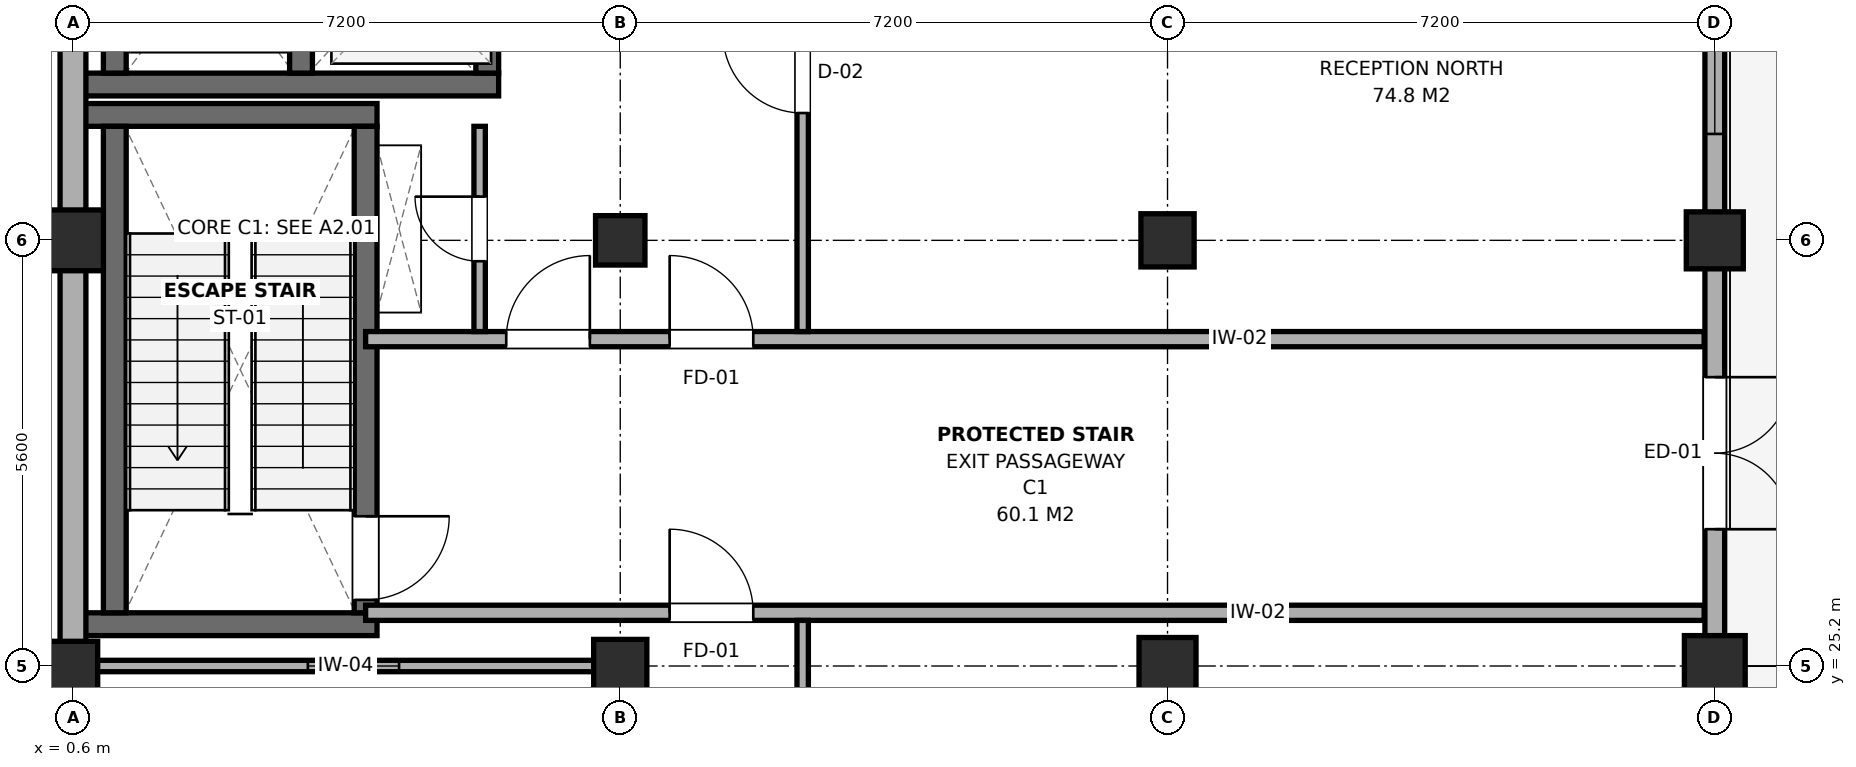
"""IFC4 building model, lengths in metres.
Left out: names, types, materials, properties, quantities, classifications, styles, units other than length and angle.
Written with IfcOpenShell. Run it as: python <this file> out.ifc"""

import sys

from ifc_helpers import new_model, si_unit, direction, frame, frame_2d, origin, origin_2d, place, context, subcontext, project, spatial, rectangle, extrude, element, fill, save


model = new_model("IFC4")
c1 = context("Model", 3, precision=1e-05, world=origin(), true_north=direction((0.0, 1.0)))
c2 = subcontext(c1, "Body", "Model", "MODEL_VIEW")
j1 = project(units=[si_unit("LENGTHUNIT", "METRE"), si_unit("PLANEANGLEUNIT", "RADIAN")], contexts=[c1])
p1 = place(None, origin())
s1 = spatial("IfcSite", under=j1, at=p1, CompositionType="ELEMENT")
p2 = place(p1, origin())
s2 = spatial("IfcBuilding", under=s1, at=p2, CompositionType="ELEMENT")
p3 = place(p2, origin())
s3 = spatial("IfcBuildingStorey", under=s2, at=p3, CompositionType="ELEMENT", Elevation=0.0)
p4 = place(p3, frame((0.6, 25.2, 0.0), z_axis=(0.0, 0.0, 1.0), x_axis=(1.0, 0.0, 0.0)))
e1 = element("IfcColumn", 1, at=p4, inside=s3, PredefinedType="COLUMN", context=c2, shape_type="SweptSolid", body=[
    extrude(rectangle(XDim=0.65, YDim=0.65, at=origin_2d()), origin(), (0.0, 0.0, 1.0), 4.8),
])
p5 = place(p3, frame((0.6, 30.8, 0.0), z_axis=(0.0, 0.0, 1.0), x_axis=(1.0, 0.0, 0.0)))
e2 = element("IfcColumn", 2, at=p5, inside=s3, PredefinedType="COLUMN", context=c2, shape_type="SweptSolid", body=[
    extrude(rectangle(XDim=0.8, YDim=0.8, at=origin_2d()), origin(), (0.0, 0.0, 1.0), 4.8),
])
p6 = place(p3, frame((7.8, 25.2, 0.0), z_axis=(0.0, 0.0, 1.0), x_axis=(1.0, 0.0, 0.0)))
e3 = element("IfcColumn", 3, at=p6, inside=s3, PredefinedType="COLUMN", context=c2, shape_type="SweptSolid", body=[
    extrude(rectangle(XDim=0.7, YDim=0.7, at=origin_2d()), origin(), (0.0, 0.0, 1.0), 4.8),
])
p7 = place(p3, frame((7.8, 30.8, 0.0), z_axis=(0.0, 0.0, 1.0), x_axis=(1.0, 0.0, 0.0)))
e4 = element("IfcColumn", 4, at=p7, inside=s3, PredefinedType="COLUMN", context=c2, shape_type="SweptSolid", body=[
    extrude(rectangle(XDim=0.65, YDim=0.65, at=origin_2d()), origin(), (0.0, 0.0, 1.0), 4.8),
])
p8 = place(p3, frame((15.0, 25.2, 0.0), z_axis=(0.0, 0.0, 1.0), x_axis=(1.0, 0.0, 0.0)))
e5 = element("IfcColumn", 5, at=p8, inside=s3, PredefinedType="COLUMN", context=c2, shape_type="SweptSolid", body=[
    extrude(rectangle(XDim=0.75, YDim=0.75, at=origin_2d()), origin(), (0.0, 0.0, 1.0), 4.8),
])
p9 = place(p3, frame((15.0, 30.8, 0.0), z_axis=(0.0, 0.0, 1.0), x_axis=(1.0, 0.0, 0.0)))
e6 = element("IfcColumn", 6, at=p9, inside=s3, PredefinedType="COLUMN", context=c2, shape_type="SweptSolid", body=[
    extrude(rectangle(XDim=0.7, YDim=0.7, at=origin_2d()), origin(), (0.0, 0.0, 1.0), 4.8),
])
p10 = place(p3, frame((22.2, 25.2, 0.0), z_axis=(0.0, 0.0, 1.0), x_axis=(1.0, 0.0, 0.0)))
e7 = element("IfcColumn", 7, at=p10, inside=s3, PredefinedType="COLUMN", context=c2, shape_type="SweptSolid", body=[
    extrude(rectangle(XDim=0.8, YDim=0.8, at=origin_2d()), origin(), (0.0, 0.0, 1.0), 4.8),
])
p11 = place(p3, frame((22.2, 30.8, 0.0), z_axis=(0.0, 0.0, 1.0), x_axis=(1.0, 0.0, 0.0)))
e8 = element("IfcColumn", 8, at=p11, inside=s3, PredefinedType="COLUMN", context=c2, shape_type="SweptSolid", body=[
    extrude(rectangle(XDim=0.75, YDim=0.75, at=origin_2d()), origin(), (0.0, 0.0, 1.0), 4.8),
])
for number, where, z_axis, x_axis in (
    (9, (0.75, 25.75, 0.0), (0.0, 0.0, 1.0), (1.0, 0.0, 0.0)),
    (10, (0.75, 32.45, 0.0), (0.0, 0.0, 1.0), (1.0, 0.0, 0.0)),
):
    element("IfcWall", number, at=place(p3, frame(where, z_axis=z_axis, x_axis=x_axis)), inside=s3, PredefinedType="SHEAR", context=c2, shape_type="SweptSolid", body=[
        extrude(rectangle(XDim=3.85, YDim=0.3, at=frame_2d((1.925, 0.0))), origin(), (0.0, 0.0, 1.0), 4.56),
    ])
p12 = place(p3, frame((1.15, 25.9, 0.0), z_axis=(0.0, 0.0, 1.0), x_axis=(0.0, 1.0, 0.0)))
e11 = element("IfcWall", 11, at=p12, inside=s3, PredefinedType="SHEAR", context=c2, shape_type="SweptSolid", body=[
    extrude(rectangle(XDim=6.4, YDim=0.3, at=frame_2d((3.2, 0.0))), origin(), (0.0, 0.0, 1.0), 4.56),
])
p13 = place(p3, frame((4.45, 25.9, 0.0), z_axis=(0.0, 0.0, 1.0), x_axis=(0.0, 1.0, 0.0)))
e12 = element("IfcWall", 12, at=p13, inside=s3, PredefinedType="SHEAR", context=c2, shape_type="SweptSolid", body=[
    extrude(rectangle(XDim=6.4, YDim=0.3, at=frame_2d((3.2, 0.0))), origin(), (0.0, 0.0, 1.0), 4.56),
])
p14 = place(p13, frame((0.17, 0.0, 0.0)))
e13 = element("IfcOpeningElement", 13, at=p14, cuts=e12, PredefinedType="OPENING", context=c2, shape_type="SweptSolid", body=[
    extrude(rectangle(XDim=1.1, YDim=2.15, at=frame_2d((0.55, 1.075))), frame((0.0, 0.165, 0.0), z_axis=(0.0, -1.0, 0.0), x_axis=(1.0, 0.0, 0.0)), (0.0, 0.0, 1.0), 0.33),
])
p15 = place(p3, frame((0.75, 32.85, 0.0), z_axis=(0.0, 0.0, 1.0), x_axis=(1.0, 0.0, 0.0)))
e14 = element("IfcWall", 14, at=p15, inside=s3, PredefinedType="SHEAR", context=c2, shape_type="SweptSolid", body=[
    extrude(rectangle(XDim=5.45, YDim=0.3, at=frame_2d((2.725, 0.0))), origin(), (0.0, 0.0, 1.0), 4.56),
])
for number, where, z_axis, x_axis in (
    (15, (1.15, 33.0, 0.0), (0.0, 0.0, 1.0), (0.0, 1.0, 0.0)),
    (16, (3.6, 33.0, 0.0), (0.0, 0.0, 1.0), (0.0, 1.0, 0.0)),
):
    element("IfcWall", number, at=place(p3, frame(where, z_axis=z_axis, x_axis=x_axis)), inside=s3, PredefinedType="SHEAR", context=c2, shape_type="SweptSolid", body=[
        extrude(rectangle(XDim=3.0, YDim=0.3, at=frame_2d((1.5, 0.0))), origin(), (0.0, 0.0, 1.0), 4.56),
    ])
p16 = place(p3, frame((6.05, 33.0, 0.0), z_axis=(0.0, 0.0, 1.0), x_axis=(0.0, 1.0, 0.0)))
e17 = element("IfcWall", 17, at=p16, inside=s3, PredefinedType="SHEAR", context=c2, shape_type="SweptSolid", body=[
    extrude(rectangle(XDim=2.4, YDim=0.3, at=frame_2d((1.2, 0.0))), origin(), (0.0, 0.0, 1.0), 4.56),
])
p17 = place(p16, frame((0.7, 0.0, 0.0)))
e18 = element("IfcOpeningElement", 18, at=p17, cuts=e17, PredefinedType="OPENING", context=c2, shape_type="SweptSolid", body=[
    extrude(rectangle(XDim=1.0, YDim=2.15, at=frame_2d((0.5, 1.075))), frame((0.0, 0.165, 0.0), z_axis=(0.0, -1.0, 0.0), x_axis=(1.0, 0.0, 0.0)), (0.0, 0.0, 1.0), 0.33),
])
p18 = place(p3, frame((0.6, 17.23, 0.0), z_axis=(0.0, 0.0, 1.0), x_axis=(0.0, 1.0, 0.0)))
e19 = element("IfcWall", 19, at=p18, inside=s3, PredefinedType="SOLIDWALL", context=c2, shape_type="SweptSolid", body=[
    extrude(rectangle(XDim=7.97, YDim=0.34, at=frame_2d((3.985, 0.0))), origin(), (0.0, 0.0, 1.0), 3.955),
])
p19 = place(p3, frame((0.6, 25.2, 0.0), z_axis=(0.0, 0.0, 1.0), x_axis=(0.0, 1.0, 0.0)))
e20 = element("IfcWall", 20, at=p19, inside=s3, PredefinedType="SOLIDWALL", context=c2, shape_type="SweptSolid", body=[
    extrude(rectangle(XDim=5.6, YDim=0.34, at=frame_2d((2.8, 0.0))), origin(), (0.0, 0.0, 1.0), 4.005),
])
p20 = place(p3, frame((0.6, 30.8, 0.0), z_axis=(0.0, 0.0, 1.0), x_axis=(0.0, 1.0, 0.0)))
e21 = element("IfcWall", 21, at=p20, inside=s3, PredefinedType="SOLIDWALL", context=c2, shape_type="SweptSolid", body=[
    extrude(rectangle(XDim=5.6, YDim=0.34, at=frame_2d((2.8, 0.0))), origin(), (0.0, 0.0, 1.0), 4.055),
])
p21 = place(p3, frame((22.2, 17.27, 0.0), z_axis=(0.0, 0.0, 1.0), x_axis=(0.0, 1.0, 0.0)))
e22 = element("IfcWall", 22, at=p21, inside=s3, PredefinedType="SOLIDWALL", context=c2, shape_type="SweptSolid", body=[
    extrude(rectangle(XDim=7.93, YDim=0.26, at=frame_2d((3.965, 0.0))), origin(), (0.0, 0.0, 1.0), 3.955),
])
p22 = place(p21, frame((1.22, 0.0, 0.9)))
e23 = element("IfcOpeningElement", 23, at=p22, cuts=e22, PredefinedType="OPENING", context=c2, shape_type="SweptSolid", body=[
    extrude(rectangle(XDim=2.0, YDim=1.8, at=frame_2d((1.0, 0.9))), frame((0.0, 0.145, 0.0), z_axis=(0.0, -1.0, 0.0), x_axis=(1.0, 0.0, 0.0)), (0.0, 0.0, 1.0), 0.29),
])
p23 = place(p21, frame((4.71, 0.0, 0.9)))
e24 = element("IfcOpeningElement", 24, at=p23, cuts=e22, PredefinedType="OPENING", context=c2, shape_type="SweptSolid", body=[
    extrude(rectangle(XDim=2.0, YDim=1.8, at=frame_2d((1.0, 0.9))), frame((0.0, 0.145, 0.0), z_axis=(0.0, -1.0, 0.0), x_axis=(1.0, 0.0, 0.0)), (0.0, 0.0, 1.0), 0.29),
])
p24 = place(p3, frame((22.2, 25.2, 0.0), z_axis=(0.0, 0.0, 1.0), x_axis=(0.0, 1.0, 0.0)))
e25 = element("IfcWall", 25, at=p24, inside=s3, PredefinedType="SOLIDWALL", context=c2, shape_type="SweptSolid", body=[
    extrude(rectangle(XDim=5.6, YDim=0.26, at=frame_2d((2.8, 0.0))), origin(), (0.0, 0.0, 1.0), 4.005),
])
p25 = place(p24, frame((1.8, 0.0, 0.0)))
e26 = element("IfcOpeningElement", 26, at=p25, cuts=e25, PredefinedType="OPENING", context=c2, shape_type="SweptSolid", body=[
    extrude(rectangle(XDim=2.0, YDim=2.25, at=frame_2d((1.0, 1.125))), frame((0.0, 0.145, 0.0), z_axis=(0.0, -1.0, 0.0), x_axis=(1.0, 0.0, 0.0)), (0.0, 0.0, 1.0), 0.29),
])
p26 = place(p3, frame((22.2, 30.8, 0.0), z_axis=(0.0, 0.0, 1.0), x_axis=(0.0, 1.0, 0.0)))
e27 = element("IfcWall", 27, at=p26, inside=s3, PredefinedType="SOLIDWALL", context=c2, shape_type="SweptSolid", body=[
    extrude(rectangle(XDim=5.6, YDim=0.26, at=frame_2d((2.8, 0.0))), origin(), (0.0, 0.0, 1.0), 4.055),
])
p27 = place(p26, frame((1.4, 0.0, 0.9)))
e28 = element("IfcOpeningElement", 28, at=p27, cuts=e27, PredefinedType="OPENING", context=c2, shape_type="SweptSolid", body=[
    extrude(rectangle(XDim=2.8, YDim=2.2, at=frame_2d((1.4, 1.1))), frame((0.0, 0.145, 0.0), z_axis=(0.0, -1.0, 0.0), x_axis=(1.0, 0.0, 0.0)), (0.0, 0.0, 1.0), 0.29),
])
p28 = place(p3, frame((4.45, 25.9, 0.0), z_axis=(0.0, 0.0, 1.0), x_axis=(1.0, 0.0, 0.0)))
e29 = element("IfcWall", 29, at=p28, inside=s3, PredefinedType="PARTITIONING", context=c2, shape_type="SweptSolid", body=[
    extrude(rectangle(XDim=17.61, YDim=0.2, at=frame_2d((8.805, 0.0))), origin(), (0.0, 0.0, 1.0), 4.005),
])
p29 = place(p28, frame((4.0, 0.0, 0.0)))
e30 = element("IfcOpeningElement", 30, at=p29, cuts=e29, PredefinedType="OPENING", context=c2, shape_type="SweptSolid", body=[
    extrude(rectangle(XDim=1.1, YDim=2.15, at=frame_2d((0.55, 1.075))), frame((0.0, 0.115, 0.0), z_axis=(0.0, -1.0, 0.0), x_axis=(1.0, 0.0, 0.0)), (0.0, 0.0, 1.0), 0.23),
])
p30 = place(p3, frame((4.45, 29.5, 0.0), z_axis=(0.0, 0.0, 1.0), x_axis=(1.0, 0.0, 0.0)))
e31 = element("IfcWall", 31, at=p30, inside=s3, PredefinedType="PARTITIONING", context=c2, shape_type="SweptSolid", body=[
    extrude(rectangle(XDim=17.61, YDim=0.2, at=frame_2d((8.805, 0.0))), origin(), (0.0, 0.0, 1.0), 4.005),
])
p31 = place(p30, frame((1.85, 0.0, 0.0)))
e32 = element("IfcOpeningElement", 32, at=p31, cuts=e31, PredefinedType="OPENING", context=c2, shape_type="SweptSolid", body=[
    extrude(rectangle(XDim=1.1, YDim=2.15, at=frame_2d((0.55, 1.075))), frame((0.0, 0.115, 0.0), z_axis=(0.0, -1.0, 0.0), x_axis=(1.0, 0.0, 0.0)), (0.0, 0.0, 1.0), 0.23),
])
p32 = place(p30, frame((4.0, 0.0, 0.0)))
e33 = element("IfcOpeningElement", 33, at=p32, cuts=e31, PredefinedType="OPENING", context=c2, shape_type="SweptSolid", body=[
    extrude(rectangle(XDim=1.1, YDim=2.15, at=frame_2d((0.55, 1.075))), frame((0.0, 0.115, 0.0), z_axis=(0.0, -1.0, 0.0), x_axis=(1.0, 0.0, 0.0)), (0.0, 0.0, 1.0), 0.23),
])
p33 = place(p3, frame((5.95, 29.6, 0.0), z_axis=(0.0, 0.0, 1.0), x_axis=(0.0, 1.0, 0.0)))
e34 = element("IfcWall", 34, at=p33, inside=s3, PredefinedType="PARTITIONING", context=c2, shape_type="SweptSolid", body=[
    extrude(rectangle(XDim=2.7, YDim=0.15, at=frame_2d((1.35, 0.0))), origin(), (0.0, 0.0, 1.0), 4.555),
])
p34 = place(p33, frame((0.925, 0.0, 0.0)))
e35 = element("IfcOpeningElement", 35, at=p34, cuts=e34, PredefinedType="OPENING", context=c2, shape_type="SweptSolid", body=[
    extrude(rectangle(XDim=0.85, YDim=2.1, at=frame_2d((0.425, 1.05))), frame((0.0, 0.09, 0.0), z_axis=(0.0, -1.0, 0.0), x_axis=(1.0, 0.0, 0.0)), (0.0, 0.0, 1.0), 0.18),
])
p35 = place(p3, frame((7.8, 17.56, 0.0), z_axis=(0.0, 0.0, 1.0), x_axis=(0.0, 1.0, 0.0)))
e36 = element("IfcWall", 36, at=p35, inside=s3, PredefinedType="PARTITIONING", context=c2, shape_type="SweptSolid", body=[
    extrude(rectangle(XDim=7.64, YDim=0.15, at=frame_2d((3.82, 0.0))), origin(), (0.0, 0.0, 1.0), 3.955),
])
p36 = place(p35, frame((3.295, 0.0, 0.0)))
e37 = element("IfcOpeningElement", 37, at=p36, cuts=e36, PredefinedType="OPENING", context=c2, shape_type="SweptSolid", body=[
    extrude(rectangle(XDim=1.05, YDim=2.15, at=frame_2d((0.525, 1.075))), frame((0.0, 0.09, 0.0), z_axis=(0.0, -1.0, 0.0), x_axis=(1.0, 0.0, 0.0)), (0.0, 0.0, 1.0), 0.18),
])
p37 = place(p3, frame((0.78, 25.2, 0.0), z_axis=(0.0, 0.0, 1.0), x_axis=(1.0, 0.0, 0.0)))
e38 = element("IfcWall", 38, at=p37, inside=s3, PredefinedType="PARTITIONING", context=c2, shape_type="SweptSolid", body=[
    extrude(rectangle(XDim=7.02, YDim=0.15, at=frame_2d((3.51, 0.0))), origin(), (0.0, 0.0, 1.0), 3.955),
])
p38 = place(p37, frame((2.91, 0.0, 0.95)))
e39 = element("IfcOpeningElement", 39, at=p38, cuts=e38, PredefinedType="OPENING", context=c2, shape_type="SweptSolid", body=[
    extrude(rectangle(XDim=1.2, YDim=1.5, at=frame_2d((0.6, 0.75))), frame((0.0, 0.09, 0.0), z_axis=(0.0, -1.0, 0.0), x_axis=(1.0, 0.0, 0.0)), (0.0, 0.0, 1.0), 0.18),
])
p39 = place(p3, frame((10.2, 17.56, 0.0), z_axis=(0.0, 0.0, 1.0), x_axis=(0.0, 1.0, 0.0)))
e40 = element("IfcWall", 40, at=p39, inside=s3, PredefinedType="PARTITIONING", context=c2, shape_type="SweptSolid", body=[
    extrude(rectangle(XDim=8.24, YDim=0.15, at=frame_2d((4.12, 0.0))), origin(), (0.0, 0.0, 1.0), 4.005),
])
p40 = place(p39, frame((3.595, 0.0, 0.0)))
e41 = element("IfcOpeningElement", 41, at=p40, cuts=e40, PredefinedType="OPENING", context=c2, shape_type="SweptSolid", body=[
    extrude(rectangle(XDim=1.05, YDim=2.15, at=frame_2d((0.525, 1.075))), frame((0.0, 0.09, 0.0), z_axis=(0.0, -1.0, 0.0), x_axis=(1.0, 0.0, 0.0)), (0.0, 0.0, 1.0), 0.18),
])
p41 = place(p3, frame((10.2, 29.6, 0.0), z_axis=(0.0, 0.0, 1.0), x_axis=(0.0, 1.0, 0.0)))
e42 = element("IfcWall", 42, at=p41, inside=s3, PredefinedType="PARTITIONING", context=c2, shape_type="SweptSolid", body=[
    extrude(rectangle(XDim=6.8, YDim=0.15, at=frame_2d((3.4, 0.0))), origin(), (0.0, 0.0, 1.0), 4.055),
])
p42 = place(p41, frame((2.875, 0.0, 0.0)))
e43 = element("IfcOpeningElement", 43, at=p42, cuts=e42, PredefinedType="OPENING", context=c2, shape_type="SweptSolid", body=[
    extrude(rectangle(XDim=1.05, YDim=2.15, at=frame_2d((0.525, 1.075))), frame((0.0, 0.09, 0.0), z_axis=(0.0, -1.0, 0.0), x_axis=(1.0, 0.0, 0.0)), (0.0, 0.0, 1.0), 0.18),
])
p43 = place(p25, frame((2.0, 0.0, 0.0), z_axis=(0.0, 0.0, 1.0), x_axis=(-1.0, 0.0, 0.0)))
e44 = element("IfcDoor", 44, at=p43, inside=s3, OperationType="DOUBLE_DOOR_SINGLE_SWING", PredefinedType="DOOR", context=c2, shape_type="SweptSolid", body=[
    extrude(rectangle(XDim=2.0, YDim=2.25, at=frame_2d((1.0, 1.125))), frame((0.0, 0.025, 0.0), z_axis=(0.0, -1.0, 0.0), x_axis=(1.0, 0.0, 0.0)), (0.0, 0.0, 1.0), 0.05),
])
fill(e26, e44)
p44 = place(p27, origin())
e45 = element("IfcWindow", 45, at=p44, inside=s3, PartitioningType="SINGLE_PANEL", PredefinedType="WINDOW", context=c2, shape_type="SweptSolid", body=[
    extrude(rectangle(XDim=2.8, YDim=2.2, at=frame_2d((1.4, 1.1))), frame((0.0, 0.03, 0.0), z_axis=(0.0, -1.0, 0.0), x_axis=(1.0, 0.0, 0.0)), (0.0, 0.0, 1.0), 0.06),
])
fill(e28, e45)
p45 = place(p14, frame((1.1, 0.0, 0.0), z_axis=(0.0, 0.0, 1.0), x_axis=(-1.0, 0.0, 0.0)))
e46 = element("IfcDoor", 46, at=p45, inside=s3, OperationType="SINGLE_SWING_LEFT", PredefinedType="DOOR", context=c2, shape_type="SweptSolid", body=[
    extrude(rectangle(XDim=1.1, YDim=2.15, at=frame_2d((0.55, 1.075))), frame((0.0, 0.025, 0.0), z_axis=(0.0, -1.0, 0.0), x_axis=(1.0, 0.0, 0.0)), (0.0, 0.0, 1.0), 0.05),
])
fill(e13, e46)
p46 = place(p29, origin())
e47 = element("IfcDoor", 47, at=p46, inside=s3, OperationType="SINGLE_SWING_LEFT", PredefinedType="DOOR", context=c2, shape_type="SweptSolid", body=[
    extrude(rectangle(XDim=1.1, YDim=2.15, at=frame_2d((0.55, 1.075))), frame((0.0, 0.025, 0.0), z_axis=(0.0, -1.0, 0.0), x_axis=(1.0, 0.0, 0.0)), (0.0, 0.0, 1.0), 0.05),
])
fill(e30, e47)
p47 = place(p31, origin())
e48 = element("IfcDoor", 48, at=p47, inside=s3, OperationType="SINGLE_SWING_RIGHT", PredefinedType="DOOR", context=c2, shape_type="SweptSolid", body=[
    extrude(rectangle(XDim=1.1, YDim=2.15, at=frame_2d((0.55, 1.075))), frame((0.0, 0.025, 0.0), z_axis=(0.0, -1.0, 0.0), x_axis=(1.0, 0.0, 0.0)), (0.0, 0.0, 1.0), 0.05),
])
fill(e32, e48)
p48 = place(p32, origin())
e49 = element("IfcDoor", 49, at=p48, inside=s3, OperationType="SINGLE_SWING_LEFT", PredefinedType="DOOR", context=c2, shape_type="SweptSolid", body=[
    extrude(rectangle(XDim=1.1, YDim=2.15, at=frame_2d((0.55, 1.075))), frame((0.0, 0.025, 0.0), z_axis=(0.0, -1.0, 0.0), x_axis=(1.0, 0.0, 0.0)), (0.0, 0.0, 1.0), 0.05),
])
fill(e33, e49)
p49 = place(p34, origin())
e50 = element("IfcDoor", 50, at=p49, inside=s3, OperationType="SINGLE_SWING_RIGHT", PredefinedType="DOOR", context=c2, shape_type="SweptSolid", body=[
    extrude(rectangle(XDim=0.85, YDim=2.1, at=frame_2d((0.425, 1.05))), frame((0.0, 0.025, 0.0), z_axis=(0.0, -1.0, 0.0), x_axis=(1.0, 0.0, 0.0)), (0.0, 0.0, 1.0), 0.05),
])
fill(e35, e50)
p50 = place(p38, origin())
e51 = element("IfcWindow", 51, at=p50, inside=s3, PartitioningType="SINGLE_PANEL", PredefinedType="WINDOW", context=c2, shape_type="SweptSolid", body=[
    extrude(rectangle(XDim=1.2, YDim=1.5, at=frame_2d((0.6, 0.75))), frame((0.0, 0.03, 0.0), z_axis=(0.0, -1.0, 0.0), x_axis=(1.0, 0.0, 0.0)), (0.0, 0.0, 1.0), 0.06),
])
fill(e39, e51)
p51 = place(p42, origin())
e52 = element("IfcDoor", 52, at=p51, inside=s3, OperationType="SINGLE_SWING_RIGHT", PredefinedType="DOOR", context=c2, shape_type="SweptSolid", body=[
    extrude(rectangle(XDim=1.05, YDim=2.15, at=frame_2d((0.525, 1.075))), frame((0.0, 0.025, 0.0), z_axis=(0.0, -1.0, 0.0), x_axis=(1.0, 0.0, 0.0)), (0.0, 0.0, 1.0), 0.05),
])
fill(e43, e52)
save(model, sys.argv[1])
